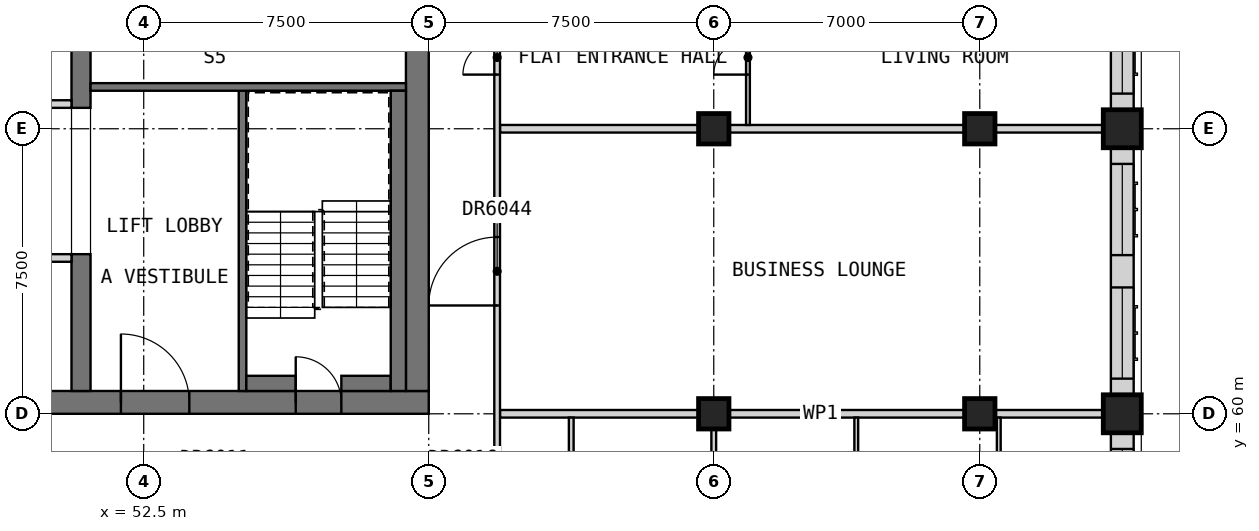
"""IFC4 building model, lengths in metres.
Left out: names, types, materials, properties, quantities, classifications, styles, units other than length and angle.
Written with IfcOpenShell. Run it as: python <this file> out.ifc"""

import sys

from ifc_helpers import new_model, si_unit, direction, frame, frame_2d, origin, origin_2d, place, context, subcontext, project, spatial, rectangle, extrude, element, fill, save


model = new_model("IFC4")
c1 = context("Model", 3, precision=1e-05, world=origin(), true_north=direction((0.0, 1.0)))
c2 = subcontext(c1, "Body", "Model", "MODEL_VIEW")
j1 = project(units=[si_unit("LENGTHUNIT", "METRE"), si_unit("PLANEANGLEUNIT", "RADIAN")], contexts=[c1])
p1 = place(None, origin())
s1 = spatial("IfcSite", under=j1, at=p1, CompositionType="ELEMENT")
p2 = place(p1, origin())
s2 = spatial("IfcBuilding", under=s1, at=p2, CompositionType="ELEMENT")
p3 = place(p2, frame((0.0, 0.0, 254.7)))
s3 = spatial("IfcBuildingStorey", under=s2, at=p3, CompositionType="ELEMENT", Elevation=254.7)
for number, where, z_axis, x_axis in (
    (1, (78.25, 60.0, 0.0), (0.0, 0.0, 1.0), (1.0, 0.0, 0.0)),
    (2, (78.25, 67.5, 0.0), (0.0, 0.0, 1.0), (1.0, 0.0, 0.0)),
):
    element("IfcColumn", number, at=place(p3, frame(where, z_axis=z_axis, x_axis=x_axis)), inside=s3, PredefinedType="COLUMN", context=c2, shape_type="SweptSolid", body=[
        extrude(rectangle(XDim=1.0, YDim=1.0, at=origin_2d()), origin(), (0.0, 0.0, 1.0), 3.5),
    ])
for number, where, z_axis, x_axis in (
    (3, (67.5, 60.0, 0.0), (0.0, 0.0, 1.0), (1.0, 0.0, 0.0)),
    (4, (67.5, 67.5, 0.0), (0.0, 0.0, 1.0), (1.0, 0.0, 0.0)),
    (5, (74.5, 60.0, 0.0), (0.0, 0.0, 1.0), (1.0, 0.0, 0.0)),
    (6, (74.5, 67.5, 0.0), (0.0, 0.0, 1.0), (1.0, 0.0, 0.0)),
):
    element("IfcColumn", number, at=place(p3, frame(where, z_axis=z_axis, x_axis=x_axis)), inside=s3, PredefinedType="COLUMN", context=c2, shape_type="SweptSolid", body=[
        extrude(rectangle(XDim=0.8, YDim=0.8, at=origin_2d()), origin(), (0.0, 0.0, 1.0), 3.5),
    ])
p4 = place(p3, frame((30.0, 60.3, 0.0), z_axis=(0.0, 0.0, 1.0), x_axis=(1.0, 0.0, 0.0)))
e7 = element("IfcWall", 7, at=p4, inside=s3, PredefinedType="SHEAR", context=c2, shape_type="SweptSolid", body=[
    extrude(rectangle(XDim=30.0, YDim=0.6, at=frame_2d((15.0, 0.0))), origin(), (0.0, 0.0, 1.0), 3.5),
])
p5 = place(p4, frame((21.9, 0.0, 0.0)))
e8 = element("IfcOpeningElement", 8, at=p5, cuts=e7, PredefinedType="OPENING", context=c2, shape_type="SweptSolid", body=[
    extrude(rectangle(XDim=1.8, YDim=2.1, at=frame_2d((0.9, 1.05))), frame((0.0, 0.31, 0.0), z_axis=(0.0, -1.0, 0.0), x_axis=(1.0, 0.0, 0.0)), (0.0, 0.0, 1.0), 0.62),
])
p6 = place(p4, frame((26.5, 0.0, 0.0)))
e9 = element("IfcOpeningElement", 9, at=p6, cuts=e7, PredefinedType="OPENING", context=c2, shape_type="SweptSolid", body=[
    extrude(rectangle(XDim=1.2, YDim=2.1, at=frame_2d((0.6, 1.05))), frame((0.0, 0.31, 0.0), z_axis=(0.0, -1.0, 0.0), x_axis=(1.0, 0.0, 0.0)), (0.0, 0.0, 1.0), 0.62),
])
p7 = place(p3, frame((59.7, 60.6, 0.0), z_axis=(0.0, 0.0, 1.0), x_axis=(0.0, 1.0, 0.0)))
e10 = element("IfcWall", 10, at=p7, inside=s3, PredefinedType="SHEAR", context=c2, shape_type="SweptSolid", body=[
    extrude(rectangle(XDim=21.3, YDim=0.6, at=frame_2d((10.65, 0.0))), origin(), (0.0, 0.0, 1.0), 3.5),
])
p8 = place(p7, frame((14.9, 0.0, 0.0)))
e11 = element("IfcOpeningElement", 11, at=p8, cuts=e10, PredefinedType="OPENING", context=c2, shape_type="SweptSolid", body=[
    extrude(rectangle(XDim=1.8, YDim=2.1, at=frame_2d((0.9, 1.05))), frame((0.0, 0.31, 0.0), z_axis=(0.0, -1.0, 0.0), x_axis=(1.0, 0.0, 0.0)), (0.0, 0.0, 1.0), 0.62),
])
p9 = place(p3, frame((50.85, 60.6, 0.0), z_axis=(0.0, 0.0, 1.0), x_axis=(0.0, 1.0, 0.0)))
e12 = element("IfcWall", 12, at=p9, inside=s3, PredefinedType="SHEAR", context=c2, shape_type="SweptSolid", body=[
    extrude(rectangle(XDim=3.6, YDim=0.5, at=frame_2d((1.8, 0.0))), origin(), (0.0, 0.0, 1.0), 3.5),
])
p10 = place(p3, frame((50.85, 68.05, 0.0), z_axis=(0.0, 0.0, 1.0), x_axis=(0.0, 1.0, 0.0)))
e13 = element("IfcWall", 13, at=p10, inside=s3, PredefinedType="SHEAR", context=c2, shape_type="SweptSolid", body=[
    extrude(rectangle(XDim=6.4, YDim=0.5, at=frame_2d((3.2, 0.0))), origin(), (0.0, 0.0, 1.0), 3.5),
])
p11 = place(p3, frame((78.25, 53.0, 0.0), z_axis=(0.0, 0.0, 1.0), x_axis=(0.0, 1.0, 0.0)))
e14 = element("IfcWall", 14, at=p11, inside=s3, PredefinedType="SOLIDWALL", context=c2, shape_type="SweptSolid", body=[
    extrude(rectangle(XDim=6.5, YDim=0.6, at=frame_2d((3.25, 0.0))), origin(), (0.0, 0.0, 1.0), 2.75),
])
p12 = place(p11, frame((0.425, 0.0, 0.8)))
e15 = element("IfcOpeningElement", 15, at=p12, cuts=e14, PredefinedType="OPENING", context=c2, shape_type="SweptSolid", body=[
    extrude(rectangle(XDim=2.4, YDim=1.8, at=frame_2d((1.2, 0.9))), frame((0.0, 0.31, 0.0), z_axis=(0.0, -1.0, 0.0), x_axis=(1.0, 0.0, 0.0)), (0.0, 0.0, 1.0), 0.62),
])
p13 = place(p11, frame((3.675, 0.0, 0.8)))
e16 = element("IfcOpeningElement", 16, at=p13, cuts=e14, PredefinedType="OPENING", context=c2, shape_type="SweptSolid", body=[
    extrude(rectangle(XDim=2.4, YDim=1.8, at=frame_2d((1.2, 0.9))), frame((0.0, 0.31, 0.0), z_axis=(0.0, -1.0, 0.0), x_axis=(1.0, 0.0, 0.0)), (0.0, 0.0, 1.0), 0.62),
])
p14 = place(p3, frame((78.25, 60.5, 0.0), z_axis=(0.0, 0.0, 1.0), x_axis=(0.0, 1.0, 0.0)))
e17 = element("IfcWall", 17, at=p14, inside=s3, PredefinedType="SOLIDWALL", context=c2, shape_type="SweptSolid", body=[
    extrude(rectangle(XDim=6.5, YDim=0.6, at=frame_2d((3.25, 0.0))), origin(), (0.0, 0.0, 1.0), 2.75),
])
p15 = place(p14, frame((0.425, 0.0, 0.8)))
e18 = element("IfcOpeningElement", 18, at=p15, cuts=e17, PredefinedType="OPENING", context=c2, shape_type="SweptSolid", body=[
    extrude(rectangle(XDim=2.4, YDim=1.8, at=frame_2d((1.2, 0.9))), frame((0.0, 0.31, 0.0), z_axis=(0.0, -1.0, 0.0), x_axis=(1.0, 0.0, 0.0)), (0.0, 0.0, 1.0), 0.62),
])
p16 = place(p14, frame((3.675, 0.0, 0.8)))
e19 = element("IfcOpeningElement", 19, at=p16, cuts=e17, PredefinedType="OPENING", context=c2, shape_type="SweptSolid", body=[
    extrude(rectangle(XDim=2.4, YDim=1.8, at=frame_2d((1.2, 0.9))), frame((0.0, 0.31, 0.0), z_axis=(0.0, -1.0, 0.0), x_axis=(1.0, 0.0, 0.0)), (0.0, 0.0, 1.0), 0.62),
])
p17 = place(p3, frame((78.25, 68.0, 0.0), z_axis=(0.0, 0.0, 1.0), x_axis=(0.0, 1.0, 0.0)))
e20 = element("IfcWall", 20, at=p17, inside=s3, PredefinedType="SOLIDWALL", context=c2, shape_type="SweptSolid", body=[
    extrude(rectangle(XDim=6.5, YDim=0.6, at=frame_2d((3.25, 0.0))), origin(), (0.0, 0.0, 1.0), 2.75),
])
p18 = place(p17, frame((0.425, 0.0, 0.8)))
e21 = element("IfcOpeningElement", 21, at=p18, cuts=e20, PredefinedType="OPENING", context=c2, shape_type="SweptSolid", body=[
    extrude(rectangle(XDim=2.4, YDim=1.8, at=frame_2d((1.2, 0.9))), frame((0.0, 0.31, 0.0), z_axis=(0.0, -1.0, 0.0), x_axis=(1.0, 0.0, 0.0)), (0.0, 0.0, 1.0), 0.62),
])
p19 = place(p17, frame((3.675, 0.0, 0.8)))
e22 = element("IfcOpeningElement", 22, at=p19, cuts=e20, PredefinedType="OPENING", context=c2, shape_type="SweptSolid", body=[
    extrude(rectangle(XDim=2.4, YDim=1.8, at=frame_2d((1.2, 0.9))), frame((0.0, 0.31, 0.0), z_axis=(0.0, -1.0, 0.0), x_axis=(1.0, 0.0, 0.0)), (0.0, 0.0, 1.0), 0.62),
])
p20 = place(p3, frame((35.0, 64.1, 0.0), z_axis=(0.0, 0.0, 1.0), x_axis=(1.0, 0.0, 0.0)))
e23 = element("IfcWall", 23, at=p20, inside=s3, PredefinedType="PARTITIONING", context=c2, shape_type="SweptSolid", body=[
    extrude(rectangle(XDim=15.6, YDim=0.2, at=frame_2d((7.8, 0.0))), origin(), (0.0, 0.0, 1.0), 3.09),
])
p21 = place(p20, frame((7.35, 0.0, 0.0)))
e24 = element("IfcOpeningElement", 24, at=p21, cuts=e23, PredefinedType="OPENING", context=c2, shape_type="SweptSolid", body=[
    extrude(rectangle(XDim=0.9, YDim=2.1, at=frame_2d((0.45, 1.05))), frame((0.0, 0.11, 0.0), z_axis=(0.0, -1.0, 0.0), x_axis=(1.0, 0.0, 0.0)), (0.0, 0.0, 1.0), 0.22),
])
p22 = place(p3, frame((35.0, 68.15, 0.0), z_axis=(0.0, 0.0, 1.0), x_axis=(1.0, 0.0, 0.0)))
e25 = element("IfcWall", 25, at=p22, inside=s3, PredefinedType="PARTITIONING", context=c2, shape_type="SweptSolid", body=[
    extrude(rectangle(XDim=15.6, YDim=0.2, at=frame_2d((7.8, 0.0))), origin(), (0.0, 0.0, 1.0), 3.09),
])
p23 = place(p22, frame((2.15, 0.0, 0.0)))
e26 = element("IfcOpeningElement", 26, at=p23, cuts=e25, PredefinedType="OPENING", context=c2, shape_type="SweptSolid", body=[
    extrude(rectangle(XDim=0.9, YDim=2.1, at=frame_2d((0.45, 1.05))), frame((0.0, 0.11, 0.0), z_axis=(0.0, -1.0, 0.0), x_axis=(1.0, 0.0, 0.0)), (0.0, 0.0, 1.0), 0.22),
])
p24 = place(p22, frame((7.35, 0.0, 0.0)))
e27 = element("IfcOpeningElement", 27, at=p24, cuts=e25, PredefinedType="OPENING", context=c2, shape_type="SweptSolid", body=[
    extrude(rectangle(XDim=0.9, YDim=2.1, at=frame_2d((0.45, 1.05))), frame((0.0, 0.11, 0.0), z_axis=(0.0, -1.0, 0.0), x_axis=(1.0, 0.0, 0.0)), (0.0, 0.0, 1.0), 0.22),
])
p25 = place(p22, frame((12.55, 0.0, 0.0)))
e28 = element("IfcOpeningElement", 28, at=p25, cuts=e25, PredefinedType="OPENING", context=c2, shape_type="SweptSolid", body=[
    extrude(rectangle(XDim=0.9, YDim=2.1, at=frame_2d((0.45, 1.05))), frame((0.0, 0.11, 0.0), z_axis=(0.0, -1.0, 0.0), x_axis=(1.0, 0.0, 0.0)), (0.0, 0.0, 1.0), 0.22),
])
p26 = place(p3, frame((55.1, 60.6, 0.0), z_axis=(0.0, 0.0, 1.0), x_axis=(0.0, 1.0, 0.0)))
e29 = element("IfcWall", 29, at=p26, inside=s3, PredefinedType="SOLIDWALL", context=c2, shape_type="SweptSolid", body=[
    extrude(rectangle(XDim=8.0, YDim=0.2, at=frame_2d((4.0, 0.0))), origin(), (0.0, 0.0, 1.0), 3.09),
])
p27 = place(p3, frame((51.1, 68.6, 0.0), z_axis=(0.0, 0.0, 1.0), x_axis=(1.0, 0.0, 0.0)))
e30 = element("IfcWall", 30, at=p27, inside=s3, PredefinedType="SOLIDWALL", context=c2, shape_type="SweptSolid", body=[
    extrude(rectangle(XDim=8.3, YDim=0.2, at=frame_2d((4.15, 0.0))), origin(), (0.0, 0.0, 1.0), 3.09),
])
for number, where, z_axis, x_axis in (
    (31, (55.2, 60.8, 0.0), (0.0, 0.0, 1.0), (1.0, 0.0, 0.0)),
    (32, (57.7, 60.8, 0.0), (0.0, 0.0, 1.0), (1.0, 0.0, 0.0)),
):
    element("IfcWall", number, at=place(p3, frame(where, z_axis=z_axis, x_axis=x_axis)), inside=s3, PredefinedType="SOLIDWALL", context=c2, shape_type="SweptSolid", body=[
        extrude(rectangle(XDim=1.3, YDim=0.4, at=frame_2d((0.65, 0.0))), origin(), (0.0, 0.0, 1.0), 3.09),
    ])
p28 = place(p3, frame((59.2, 60.6, 0.0), z_axis=(0.0, 0.0, 1.0), x_axis=(0.0, 1.0, 0.0)))
e33 = element("IfcWall", 33, at=p28, inside=s3, PredefinedType="SOLIDWALL", context=c2, shape_type="SweptSolid", body=[
    extrude(rectangle(XDim=7.9, YDim=0.4, at=frame_2d((3.95, 0.0))), origin(), (0.0, 0.0, 1.0), 3.09),
])
for number, where, z_axis, x_axis in (
    (34, (61.875, 60.0, 0.0), (0.0, 0.0, 1.0), (1.0, 0.0, 0.0)),
    (35, (61.875, 67.5, 0.0), (0.0, 0.0, 1.0), (1.0, 0.0, 0.0)),
):
    element("IfcWall", number, at=place(p3, frame(where, z_axis=z_axis, x_axis=x_axis)), inside=s3, PredefinedType="PARTITIONING", context=c2, shape_type="SweptSolid", body=[
        extrude(rectangle(XDim=16.875, YDim=0.2, at=frame_2d((8.438, 0.0))), origin(), (0.0, 0.0, 1.0), 3.1),
    ])
p29 = place(p3, frame((61.8, 58.275, 0.0), z_axis=(0.0, 0.0, 1.0), x_axis=(0.0, 1.0, 0.0)))
e36 = element("IfcWall", 36, at=p29, inside=s3, PredefinedType="PARTITIONING", context=c2, shape_type="SweptSolid", body=[
    extrude(rectangle(XDim=25.95, YDim=0.15, at=frame_2d((12.975, 0.0))), origin(), (0.0, 0.0, 1.0), 3.1),
])
p30 = place(p29, frame((4.575, 0.0, 0.0)))
e37 = element("IfcOpeningElement", 37, at=p30, cuts=e36, PredefinedType="OPENING", context=c2, shape_type="SweptSolid", body=[
    extrude(rectangle(XDim=1.8, YDim=2.1, at=frame_2d((0.9, 1.05))), frame((0.0, 0.085, 0.0), z_axis=(0.0, -1.0, 0.0), x_axis=(1.0, 0.0, 0.0)), (0.0, 0.0, 1.0), 0.17),
])
p31 = place(p29, frame((10.65, 0.0, 0.0)))
e38 = element("IfcOpeningElement", 38, at=p31, cuts=e36, PredefinedType="OPENING", context=c2, shape_type="SweptSolid", body=[
    extrude(rectangle(XDim=0.9, YDim=2.1, at=frame_2d((0.45, 1.05))), frame((0.0, 0.085, 0.0), z_axis=(0.0, -1.0, 0.0), x_axis=(1.0, 0.0, 0.0)), (0.0, 0.0, 1.0), 0.17),
])
p32 = place(p29, frame((18.15, 0.0, 0.0)))
e39 = element("IfcOpeningElement", 39, at=p32, cuts=e36, PredefinedType="OPENING", context=c2, shape_type="SweptSolid", body=[
    extrude(rectangle(XDim=0.9, YDim=2.1, at=frame_2d((0.45, 1.05))), frame((0.0, 0.085, 0.0), z_axis=(0.0, -1.0, 0.0), x_axis=(1.0, 0.0, 0.0)), (0.0, 0.0, 1.0), 0.17),
])
p33 = place(p3, frame((68.4, 67.6, 0.0), z_axis=(0.0, 0.0, 1.0), x_axis=(0.0, 1.0, 0.0)))
e40 = element("IfcWall", 40, at=p33, inside=s3, PredefinedType="PARTITIONING", context=c2, shape_type="SweptSolid", body=[
    extrude(rectangle(XDim=14.8, YDim=0.1, at=frame_2d((7.4, 0.0))), origin(), (0.0, 0.0, 1.0), 3.1),
])
p34 = place(p33, frame((1.325, 0.0, 0.0)))
e41 = element("IfcOpeningElement", 41, at=p34, cuts=e40, PredefinedType="OPENING", context=c2, shape_type="SweptSolid", body=[
    extrude(rectangle(XDim=0.9, YDim=2.1, at=frame_2d((0.45, 1.05))), frame((0.0, 0.06, 0.0), z_axis=(0.0, -1.0, 0.0), x_axis=(1.0, 0.0, 0.0)), (0.0, 0.0, 1.0), 0.12),
])
p35 = place(p33, frame((8.825, 0.0, 0.0)))
e42 = element("IfcOpeningElement", 42, at=p35, cuts=e40, PredefinedType="OPENING", context=c2, shape_type="SweptSolid", body=[
    extrude(rectangle(XDim=0.9, YDim=2.1, at=frame_2d((0.45, 1.05))), frame((0.0, 0.06, 0.0), z_axis=(0.0, -1.0, 0.0), x_axis=(1.0, 0.0, 0.0)), (0.0, 0.0, 1.0), 0.12),
])
p36 = place(p3, frame((71.25, 49.0, 0.0), z_axis=(0.0, 0.0, 1.0), x_axis=(0.0, 1.0, 0.0)))
e43 = element("IfcWall", 43, at=p36, inside=s3, PredefinedType="PARTITIONING", context=c2, shape_type="SweptSolid", body=[
    extrude(rectangle(XDim=10.9, YDim=0.1, at=frame_2d((5.45, 0.0))), origin(), (0.0, 0.0, 1.0), 3.1),
])
p37 = place(p3, frame((75.0, 47.06, 0.0), z_axis=(0.0, 0.0, 1.0), x_axis=(0.0, 1.0, 0.0)))
e44 = element("IfcWall", 44, at=p37, inside=s3, PredefinedType="PARTITIONING", context=c2, shape_type="SweptSolid", body=[
    extrude(rectangle(XDim=12.84, YDim=0.1, at=frame_2d((6.42, 0.0))), origin(), (0.0, 0.0, 1.0), 3.1),
])
p38 = place(p37, frame((0.24, 0.0, 0.0)))
e45 = element("IfcOpeningElement", 45, at=p38, cuts=e44, PredefinedType="OPENING", context=c2, shape_type="SweptSolid", body=[
    extrude(rectangle(XDim=0.9, YDim=2.1, at=frame_2d((0.45, 1.05))), frame((0.0, 0.06, 0.0), z_axis=(0.0, -1.0, 0.0), x_axis=(1.0, 0.0, 0.0)), (0.0, 0.0, 1.0), 0.12),
])
p39 = place(p3, frame((63.75, 54.538, 0.0), z_axis=(0.0, 0.0, 1.0), x_axis=(0.0, 1.0, 0.0)))
e46 = element("IfcWall", 46, at=p39, inside=s3, PredefinedType="PARTITIONING", context=c2, shape_type="SweptSolid", body=[
    extrude(rectangle(XDim=5.362, YDim=0.125, at=frame_2d((2.681, 0.0))), origin(), (0.0, 0.0, 1.0), 3.1),
])
p40 = place(p39, frame((2.25, 0.0, 0.0)))
e47 = element("IfcOpeningElement", 47, at=p40, cuts=e46, PredefinedType="OPENING", context=c2, shape_type="SweptSolid", body=[
    extrude(rectangle(XDim=0.9, YDim=2.1, at=frame_2d((0.45, 1.05))), frame((0.0, 0.073, 0.0), z_axis=(0.0, -1.0, 0.0), x_axis=(1.0, 0.0, 0.0)), (0.0, 0.0, 1.0), 0.145),
])
p41 = place(p3, frame((67.5, 54.538, 0.0), z_axis=(0.0, 0.0, 1.0), x_axis=(0.0, 1.0, 0.0)))
e48 = element("IfcWall", 48, at=p41, inside=s3, PredefinedType="PARTITIONING", context=c2, shape_type="SweptSolid", body=[
    extrude(rectangle(XDim=5.362, YDim=0.125, at=frame_2d((2.681, 0.0))), origin(), (0.0, 0.0, 1.0), 3.1),
])
p42 = place(p13, origin())
e49 = element("IfcWindow", 49, at=p42, inside=s3, PartitioningType="SINGLE_PANEL", PredefinedType="WINDOW", context=c2, shape_type="SweptSolid", body=[
    extrude(rectangle(XDim=2.4, YDim=1.8, at=frame_2d((1.2, 0.9))), frame((0.0, -0.07, 0.0), z_axis=(0.0, -1.0, 0.0), x_axis=(1.0, 0.0, 0.0)), (0.0, 0.0, 1.0), 0.06),
])
fill(e16, e49)
p43 = place(p15, origin())
e50 = element("IfcWindow", 50, at=p43, inside=s3, PartitioningType="SINGLE_PANEL", PredefinedType="WINDOW", context=c2, shape_type="SweptSolid", body=[
    extrude(rectangle(XDim=2.4, YDim=1.8, at=frame_2d((1.2, 0.9))), frame((0.0, -0.07, 0.0), z_axis=(0.0, -1.0, 0.0), x_axis=(1.0, 0.0, 0.0)), (0.0, 0.0, 1.0), 0.06),
])
fill(e18, e50)
p44 = place(p16, origin())
e51 = element("IfcWindow", 51, at=p44, inside=s3, PartitioningType="SINGLE_PANEL", PredefinedType="WINDOW", context=c2, shape_type="SweptSolid", body=[
    extrude(rectangle(XDim=2.4, YDim=1.8, at=frame_2d((1.2, 0.9))), frame((0.0, -0.07, 0.0), z_axis=(0.0, -1.0, 0.0), x_axis=(1.0, 0.0, 0.0)), (0.0, 0.0, 1.0), 0.06),
])
fill(e19, e51)
p45 = place(p18, origin())
e52 = element("IfcWindow", 52, at=p45, inside=s3, PartitioningType="SINGLE_PANEL", PredefinedType="WINDOW", context=c2, shape_type="SweptSolid", body=[
    extrude(rectangle(XDim=2.4, YDim=1.8, at=frame_2d((1.2, 0.9))), frame((0.0, -0.07, 0.0), z_axis=(0.0, -1.0, 0.0), x_axis=(1.0, 0.0, 0.0)), (0.0, 0.0, 1.0), 0.06),
])
fill(e21, e52)
p46 = place(p5, origin())
e53 = element("IfcDoor", 53, at=p46, inside=s3, OperationType="DOUBLE_DOOR_SINGLE_SWING", PredefinedType="DOOR", context=c2, shape_type="SweptSolid", body=[
    extrude(rectangle(XDim=1.8, YDim=2.1, at=frame_2d((0.9, 1.05))), frame((0.0, 0.025, 0.0), z_axis=(0.0, -1.0, 0.0), x_axis=(1.0, 0.0, 0.0)), (0.0, 0.0, 1.0), 0.05),
])
fill(e8, e53)
p47 = place(p6, origin())
e54 = element("IfcDoor", 54, at=p47, inside=s3, OperationType="SINGLE_SWING_LEFT", PredefinedType="DOOR", context=c2, shape_type="SweptSolid", body=[
    extrude(rectangle(XDim=1.2, YDim=2.1, at=frame_2d((0.6, 1.05))), frame((0.0, 0.025, 0.0), z_axis=(0.0, -1.0, 0.0), x_axis=(1.0, 0.0, 0.0)), (0.0, 0.0, 1.0), 0.05),
])
fill(e9, e54)
p48 = place(p30, origin())
e55 = element("IfcDoor", 55, at=p48, inside=s3, OperationType="DOUBLE_DOOR_SINGLE_SWING", PredefinedType="DOOR", context=c2, shape_type="SweptSolid", body=[
    extrude(rectangle(XDim=1.8, YDim=2.1, at=frame_2d((0.9, 1.05))), frame((0.0, 0.025, 0.0), z_axis=(0.0, -1.0, 0.0), x_axis=(1.0, 0.0, 0.0)), (0.0, 0.0, 1.0), 0.05),
])
fill(e37, e55)
p49 = place(p31, origin())
e56 = element("IfcDoor", 56, at=p49, inside=s3, OperationType="SINGLE_SWING_RIGHT", PredefinedType="DOOR", context=c2, shape_type="SweptSolid", body=[
    extrude(rectangle(XDim=0.9, YDim=2.1, at=frame_2d((0.45, 1.05))), frame((0.0, 0.025, 0.0), z_axis=(0.0, -1.0, 0.0), x_axis=(1.0, 0.0, 0.0)), (0.0, 0.0, 1.0), 0.05),
])
fill(e38, e56)
p50 = place(p34, origin())
e57 = element("IfcDoor", 57, at=p50, inside=s3, OperationType="SINGLE_SWING_LEFT", PredefinedType="DOOR", context=c2, shape_type="SweptSolid", body=[
    extrude(rectangle(XDim=0.9, YDim=2.1, at=frame_2d((0.45, 1.05))), frame((0.0, 0.025, 0.0), z_axis=(0.0, -1.0, 0.0), x_axis=(1.0, 0.0, 0.0)), (0.0, 0.0, 1.0), 0.05),
])
fill(e41, e57)
save(model, sys.argv[1])
